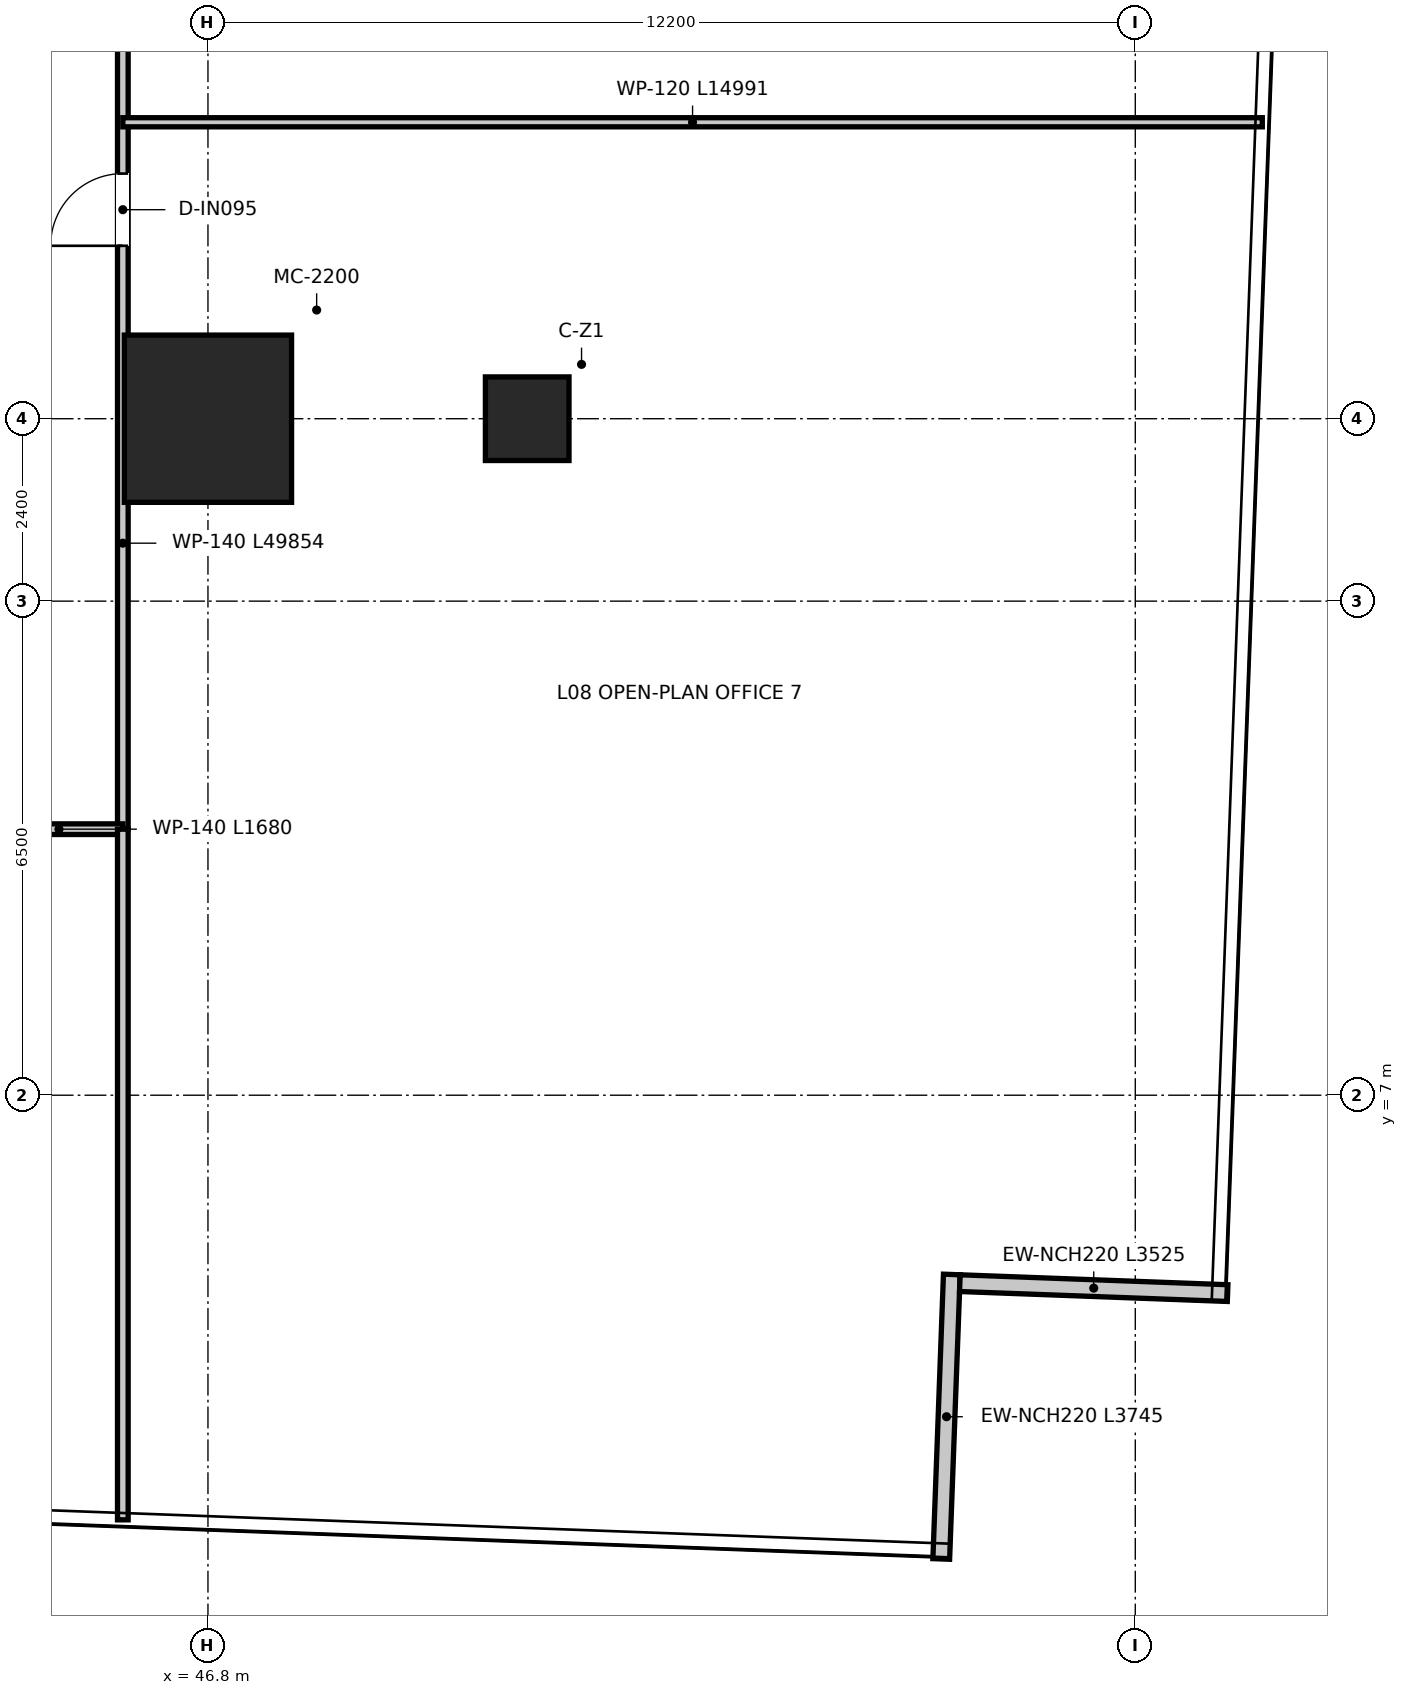
"""IFC4 building model, lengths in metres.
Left out: names, types, materials, properties, quantities, classifications, styles, units other than length and angle.
Written with IfcOpenShell. Run it as: python <this file> out.ifc"""

import sys

from ifc_helpers import new_model, si_unit, direction, frame, frame_2d, origin, origin_2d, place, context, subcontext, project, spatial, rectangle, extrude, source, transform, mapped, element, fill, save


model = new_model("IFC4")
c1 = context("Model", 3, precision=1e-05, world=origin(), true_north=direction((0.0, 1.0)))
c2 = subcontext(c1, "Body", "Model", "MODEL_VIEW")
j1 = project(units=[si_unit("LENGTHUNIT", "METRE"), si_unit("PLANEANGLEUNIT", "RADIAN")], contexts=[c1])
p1 = place(None, origin())
s1 = spatial("IfcSite", under=j1, at=p1, CompositionType="ELEMENT")
p2 = place(p1, origin())
s2 = spatial("IfcBuilding", under=s1, at=p2, CompositionType="ELEMENT")
p3 = place(p2, frame((0.0, 0.0, 36.85)))
s3 = spatial("IfcBuildingStorey", under=s2, at=p3, CompositionType="ELEMENT", Elevation=36.85)
m1 = source(origin(), c2, "Body", "SweptSolid", [
    extrude(rectangle(XDim=2.2, YDim=2.2, at=origin_2d()), origin(), (0.0, 0.0, 1.0), 3.95),
])
p4 = place(p3, frame((46.8, 15.9, 0.0), z_axis=(0.0, 0.0, 1.0), x_axis=(1.0, 0.0, 0.0)))
e1 = element("IfcColumn", 1, at=p4, inside=s3, PredefinedType="USERDEFINED", context=c2, shape_type="MappedRepresentation", body=[
    mapped(m1, transform((0.0, 0.0, 0.0), x_axis=(1.0, 0.0, 0.0), y_axis=(0.0, 1.0, 0.0), z_axis=(0.0, 0.0, 1.0), scale=1.0)),
])
m2 = source(origin(), c2, "Body", "SweptSolid", [
    extrude(rectangle(XDim=1.1, YDim=1.1, at=origin_2d()), origin(), (0.0, 0.0, 1.0), 3.95),
])
p5 = place(p3, frame((51.0, 15.9, 0.0), z_axis=(0.0, 0.0, 1.0), x_axis=(1.0, 0.0, 0.0)))
e2 = element("IfcColumn", 2, at=p5, inside=s3, PredefinedType="COLUMN", context=c2, shape_type="MappedRepresentation", body=[
    mapped(m2, transform((0.0, 0.0, 0.0), x_axis=(1.0, 0.0, 0.0), y_axis=(0.0, 1.0, 0.0), z_axis=(0.0, 0.0, 1.0), scale=1.0)),
])
p6 = place(p3, frame((56.447, 0.899, 0.0), z_axis=(0.0, 0.0, 1.0), x_axis=(0.037093640215, 0.999311794114, 0.0)))
e3 = element("IfcWall", 3, at=p6, inside=s3, PredefinedType="ELEMENTEDWALL", context=c2, shape_type="SweptSolid", body=[
    extrude(rectangle(XDim=3.745, YDim=0.22, at=frame_2d((1.873, 0.0))), origin(), (0.0, 0.0, 1.0), 3.67),
])
p7 = place(p3, frame((56.692, 4.528, 0.0), z_axis=(0.0, 0.0, 1.0), x_axis=(0.99931065272, -0.037124376896, 0.0)))
e4 = element("IfcWall", 4, at=p7, inside=s3, PredefinedType="ELEMENTEDWALL", context=c2, shape_type="SweptSolid", body=[
    extrude(rectangle(XDim=3.525, YDim=0.22, at=frame_2d((1.762, 0.0))), origin(), (0.0, 0.0, 1.0), 3.67),
])
p8 = place(p3, frame((45.68, 10.5, 0.0), z_axis=(0.0, 0.0, 1.0), x_axis=(0.0, 1.0, 0.0)))
e5 = element("IfcWall", 5, at=p8, inside=s3, PredefinedType="PARTITIONING", context=c2, shape_type="SweptSolid", body=[
    extrude(rectangle(XDim=25.62, YDim=0.14, at=frame_2d((12.81, 0.0))), origin(), (0.0, 0.0, 1.0), 2.97),
])
p9 = place(p8, frame((7.675, 0.0, 0.0)))
e6 = element("IfcOpeningElement", 6, at=p9, cuts=e5, PredefinedType="OPENING", context=c2, shape_type="SweptSolid", body=[
    extrude(rectangle(XDim=0.95, YDim=2.1, at=frame_2d((0.475, 1.05))), frame((0.0, 0.08, 0.0), z_axis=(0.0, -1.0, 0.0), x_axis=(1.0, 0.0, 0.0)), (0.0, 0.0, 1.0), 0.16),
])
p10 = place(p8, frame((11.325, 0.0, 0.0)))
e7 = element("IfcOpeningElement", 7, at=p10, cuts=e5, PredefinedType="OPENING", context=c2, shape_type="SweptSolid", body=[
    extrude(rectangle(XDim=0.95, YDim=2.1, at=frame_2d((0.475, 1.05))), frame((0.0, 0.08, 0.0), z_axis=(0.0, -1.0, 0.0), x_axis=(1.0, 0.0, 0.0)), (0.0, 0.0, 1.0), 0.16),
])
p11 = place(p8, frame((16.325, 0.0, 0.0)))
e8 = element("IfcOpeningElement", 8, at=p11, cuts=e5, PredefinedType="OPENING", context=c2, shape_type="SweptSolid", body=[
    extrude(rectangle(XDim=0.95, YDim=2.1, at=frame_2d((0.475, 1.05))), frame((0.0, 0.08, 0.0), z_axis=(0.0, -1.0, 0.0), x_axis=(1.0, 0.0, 0.0)), (0.0, 0.0, 1.0), 0.16),
])
p12 = place(p8, frame((20.625, 0.0, 0.0)))
e9 = element("IfcOpeningElement", 9, at=p12, cuts=e5, PredefinedType="OPENING", context=c2, shape_type="SweptSolid", body=[
    extrude(rectangle(XDim=0.95, YDim=2.1, at=frame_2d((0.475, 1.05))), frame((0.0, 0.08, 0.0), z_axis=(0.0, -1.0, 0.0), x_axis=(1.0, 0.0, 0.0)), (0.0, 0.0, 1.0), 0.16),
])
p13 = place(p8, frame((23.075, 0.0, 0.0)))
e10 = element("IfcOpeningElement", 10, at=p13, cuts=e5, PredefinedType="OPENING", context=c2, shape_type="SweptSolid", body=[
    extrude(rectangle(XDim=0.95, YDim=2.1, at=frame_2d((0.475, 1.05))), frame((0.0, 0.08, 0.0), z_axis=(0.0, -1.0, 0.0), x_axis=(1.0, 0.0, 0.0)), (0.0, 0.0, 1.0), 0.16),
])
p14 = place(p3, frame((44.0, 10.5, 0.0), z_axis=(0.0, 0.0, 1.0), x_axis=(1.0, 0.0, 0.0)))
e11 = element("IfcWall", 11, at=p14, inside=s3, PredefinedType="PARTITIONING", context=c2, shape_type="SweptSolid", body=[
    extrude(rectangle(XDim=1.68, YDim=0.14, at=frame_2d((0.84, 0.0))), origin(), (0.0, 0.0, 1.0), 3.67),
])
p15 = place(p3, frame((45.68, 1.414, 0.0), z_axis=(0.0, 0.0, 1.0), x_axis=(0.0, 1.0, 0.0)))
e12 = element("IfcWall", 12, at=p15, inside=s3, PredefinedType="PARTITIONING", context=c2, shape_type="SweptSolid", body=[
    extrude(rectangle(XDim=9.086, YDim=0.14, at=frame_2d((4.543, 0.0))), origin(), (0.0, 0.0, 1.0), 3.67),
])
p16 = place(p3, frame((45.68, 19.8, 0.0), z_axis=(0.0, 0.0, 1.0), x_axis=(1.0, 0.0, 0.0)))
e13 = element("IfcWall", 13, at=p16, inside=s3, PredefinedType="PARTITIONING", context=c2, shape_type="SweptSolid", body=[
    extrude(rectangle(XDim=14.991, YDim=0.12, at=frame_2d((7.496, 0.0))), origin(), (0.0, 0.0, 1.0), 2.97),
])
p17 = place(p9, origin())
e14 = element("IfcDoor", 14, at=p17, inside=s3, OperationType="SINGLE_SWING_LEFT", PredefinedType="DOOR", context=c2, shape_type="SweptSolid", body=[
    extrude(rectangle(XDim=0.95, YDim=2.1, at=frame_2d((0.475, 1.05))), frame((0.0, 0.025, 0.0), z_axis=(0.0, -1.0, 0.0), x_axis=(1.0, 0.0, 0.0)), (0.0, 0.0, 1.0), 0.05),
])
fill(e6, e14)
save(model, sys.argv[1])
